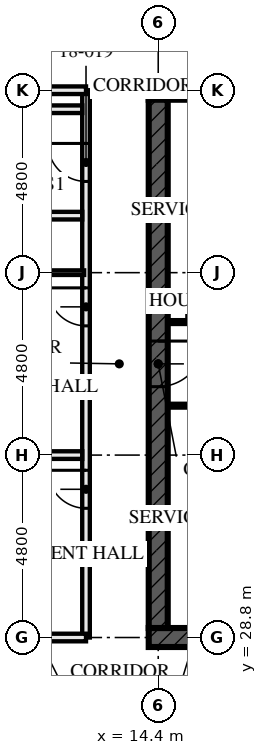
"""IFC4 building model, lengths in metres.
Left out: names, types, materials, properties, quantities, classifications, styles, units other than length and angle.
Written with IfcOpenShell. Run it as: python <this file> out.ifc"""

import sys

from ifc_helpers import new_model, si_unit, direction, frame, frame_2d, origin, place, context, subcontext, project, spatial, rectangle, extrude, element, fill, save


model = new_model("IFC4")
c1 = context("Model", 3, precision=1e-05, world=origin(), true_north=direction((0.0, 1.0)))
c2 = subcontext(c1, "Body", "Model", "MODEL_VIEW")
j1 = project(units=[si_unit("LENGTHUNIT", "METRE"), si_unit("PLANEANGLEUNIT", "RADIAN")], contexts=[c1])
p1 = place(None, origin())
s1 = spatial("IfcSite", under=j1, at=p1, CompositionType="ELEMENT")
p2 = place(p1, origin())
s2 = spatial("IfcBuilding", under=s1, at=p2, CompositionType="ELEMENT")
p3 = place(p2, frame((0.0, 0.0, 69.0)))
s3 = spatial("IfcBuildingStorey", under=s2, at=p3, CompositionType="ELEMENT", Elevation=69.0)
p4 = place(p3, frame((14.15, 28.8, -0.17), z_axis=(0.0, 0.0, 1.0), x_axis=(1.0, 0.0, 0.0)))
e1 = element("IfcWall", 1, at=p4, inside=s3, PredefinedType="SHEAR", context=c2, shape_type="SweptSolid", body=[
    extrude(rectangle(XDim=14.9, YDim=0.5, at=frame_2d((7.45, 0.0))), origin(), (0.0, 0.0, 1.0), 3.5),
])
p5 = place(p4, frame((6.85, 0.0, 0.17)))
e2 = element("IfcOpeningElement", 2, at=p5, cuts=e1, PredefinedType="OPENING", context=c2, shape_type="SweptSolid", body=[
    extrude(rectangle(XDim=1.2, YDim=2.1, at=frame_2d((0.6, 1.05))), frame((0.0, 0.26, 0.0), z_axis=(0.0, -1.0, 0.0), x_axis=(1.0, 0.0, 0.0)), (0.0, 0.0, 1.0), 0.521),
])
p6 = place(p3, frame((29.05, 43.2, -0.17), z_axis=(0.0, 0.0, 1.0), x_axis=(-1.0, 0.0, 0.0)))
e3 = element("IfcWall", 3, at=p6, inside=s3, PredefinedType="SHEAR", context=c2, shape_type="SweptSolid", body=[
    extrude(rectangle(XDim=14.9, YDim=0.5, at=frame_2d((7.45, 0.0))), origin(), (0.0, 0.0, 1.0), 3.5),
])
p7 = place(p6, frame((6.85, 0.0, 0.17)))
e4 = element("IfcOpeningElement", 4, at=p7, cuts=e3, PredefinedType="OPENING", context=c2, shape_type="SweptSolid", body=[
    extrude(rectangle(XDim=1.2, YDim=2.1, at=frame_2d((0.6, 1.05))), frame((0.0, 0.26, 0.0), z_axis=(0.0, -1.0, 0.0), x_axis=(1.0, 0.0, 0.0)), (0.0, 0.0, 1.0), 0.521),
])
p8 = place(p3, frame((14.4, 42.95, -0.17), z_axis=(0.0, 0.0, 1.0), x_axis=(0.0, -1.0, 0.0)))
e5 = element("IfcWall", 5, at=p8, inside=s3, PredefinedType="SHEAR", context=c2, shape_type="SweptSolid", body=[
    extrude(rectangle(XDim=13.9, YDim=0.5, at=frame_2d((6.95, 0.0))), origin(), (0.0, 0.0, 1.0), 3.5),
])
p9 = place(p8, frame((6.35, 0.0, 0.17)))
e6 = element("IfcOpeningElement", 6, at=p9, cuts=e5, PredefinedType="OPENING", context=c2, shape_type="SweptSolid", body=[
    extrude(rectangle(XDim=1.2, YDim=2.1, at=frame_2d((0.6, 1.05))), frame((0.0, 0.26, 0.0), z_axis=(0.0, -1.0, 0.0), x_axis=(1.0, 0.0, 0.0)), (0.0, 0.0, 1.0), 0.521),
])
for number, where, z_axis, x_axis in (
    (7, (7.7, 42.7, 0.0), (0.0, 0.0, 1.0), (1.0, 0.0, 0.0)),
    (8, (7.7, 39.9, 0.0), (0.0, 0.0, 1.0), (1.0, 0.0, 0.0)),
):
    element("IfcWall", number, at=place(p3, frame(where, z_axis=z_axis, x_axis=x_axis)), inside=s3, PredefinedType="SOLIDWALL", context=c2, shape_type="SweptSolid", body=[
        extrude(rectangle(XDim=4.7, YDim=0.2, at=frame_2d((2.35, 0.0))), origin(), (0.0, 0.0, 1.0), 2.99),
    ])
p10 = place(p3, frame((6.2, 38.4, 0.0), z_axis=(0.0, 0.0, 1.0), x_axis=(1.0, 0.0, 0.0)))
e9 = element("IfcWall", 9, at=p10, inside=s3, PredefinedType="PARTITIONING", context=c2, shape_type="SweptSolid", body=[
    extrude(rectangle(XDim=6.25, YDim=0.12, at=frame_2d((3.125, 0.0))), origin(), (0.0, 0.0, 1.0), 2.55),
])
p11 = place(p10, frame((3.9, 0.0, 0.0)))
e10 = element("IfcOpeningElement", 10, at=p11, cuts=e9, PredefinedType="OPENING", context=c2, shape_type="SweptSolid", body=[
    extrude(rectangle(XDim=0.9, YDim=2.1, at=frame_2d((0.45, 1.05))), frame((0.0, 0.071, 0.0), z_axis=(0.0, -1.0, 0.0), x_axis=(1.0, 0.0, 0.0)), (0.0, 0.0, 1.0), 0.141),
])
p12 = place(p3, frame((0.32, 33.6, 0.0), z_axis=(0.0, 0.0, 1.0), x_axis=(1.0, 0.0, 0.0)))
e11 = element("IfcWall", 11, at=p12, inside=s3, PredefinedType="PARTITIONING", context=c2, shape_type="SweptSolid", body=[
    extrude(rectangle(XDim=12.08, YDim=0.2, at=frame_2d((6.04, 0.0))), origin(), (0.0, 0.0, 1.0), 2.55),
])
p13 = place(p3, frame((12.5, 43.2, 0.0), z_axis=(0.0, 0.0, 1.0), x_axis=(0.0, -1.0, 0.0)))
e12 = element("IfcWall", 12, at=p13, inside=s3, PredefinedType="PARTITIONING", context=c2, shape_type="SweptSolid", body=[
    extrude(rectangle(XDim=14.4, YDim=0.2, at=frame_2d((7.2, 0.0))), origin(), (0.0, 0.0, 1.0), 2.55),
])
p14 = place(p13, frame((1.4, 0.0, 0.0)))
e13 = element("IfcOpeningElement", 13, at=p14, cuts=e12, PredefinedType="OPENING", context=c2, shape_type="SweptSolid", body=[
    extrude(rectangle(XDim=1.0, YDim=2.1, at=frame_2d((0.5, 1.05))), frame((0.0, 0.111, 0.0), z_axis=(0.0, -1.0, 0.0), x_axis=(1.0, 0.0, 0.0)), (0.0, 0.0, 1.0), 0.221),
])
p15 = place(p13, frame((5.2, 0.0, 0.0)))
e14 = element("IfcOpeningElement", 14, at=p15, cuts=e12, PredefinedType="OPENING", context=c2, shape_type="SweptSolid", body=[
    extrude(rectangle(XDim=1.0, YDim=2.1, at=frame_2d((0.5, 1.05))), frame((0.0, 0.111, 0.0), z_axis=(0.0, -1.0, 0.0), x_axis=(1.0, 0.0, 0.0)), (0.0, 0.0, 1.0), 0.221),
])
p16 = place(p13, frame((10.0, 0.0, 0.0)))
e15 = element("IfcOpeningElement", 15, at=p16, cuts=e12, PredefinedType="OPENING", context=c2, shape_type="SweptSolid", body=[
    extrude(rectangle(XDim=1.0, YDim=2.1, at=frame_2d((0.5, 1.05))), frame((0.0, 0.111, 0.0), z_axis=(0.0, -1.0, 0.0), x_axis=(1.0, 0.0, 0.0)), (0.0, 0.0, 1.0), 0.221),
])
p17 = place(p3, frame((14.65, 34.9, 0.0), z_axis=(0.0, 0.0, 1.0), x_axis=(1.0, 0.0, 0.0)))
e16 = element("IfcWall", 16, at=p17, inside=s3, PredefinedType="SOLIDWALL", context=c2, shape_type="SweptSolid", body=[
    extrude(rectangle(XDim=5.9, YDim=0.1, at=frame_2d((2.95, 0.0))), origin(), (0.0, 0.0, 1.0), 3.33),
])
p18 = place(p17, frame((1.6, 0.0, 0.0)))
e17 = element("IfcOpeningElement", 17, at=p18, cuts=e16, PredefinedType="OPENING", context=c2, shape_type="SweptSolid", body=[
    extrude(rectangle(XDim=0.7, YDim=2.1, at=frame_2d((0.35, 1.05))), frame((0.0, 0.061, 0.0), z_axis=(0.0, -1.0, 0.0), x_axis=(1.0, 0.0, 0.0)), (0.0, 0.0, 1.0), 0.121),
])
p19 = place(p3, frame((14.65, 37.1, 0.0), z_axis=(0.0, 0.0, 1.0), x_axis=(1.0, 0.0, 0.0)))
e18 = element("IfcWall", 18, at=p19, inside=s3, PredefinedType="SOLIDWALL", context=c2, shape_type="SweptSolid", body=[
    extrude(rectangle(XDim=5.9, YDim=0.1, at=frame_2d((2.95, 0.0))), origin(), (0.0, 0.0, 1.0), 3.33),
])
p20 = place(p19, frame((0.5, 0.0, 0.0)))
e19 = element("IfcOpeningElement", 19, at=p20, cuts=e18, PredefinedType="OPENING", context=c2, shape_type="SweptSolid", body=[
    extrude(rectangle(XDim=0.7, YDim=2.1, at=frame_2d((0.35, 1.05))), frame((0.0, 0.061, 0.0), z_axis=(0.0, -1.0, 0.0), x_axis=(1.0, 0.0, 0.0)), (0.0, 0.0, 1.0), 0.121),
])
p21 = place(p19, frame((1.85, 0.0, 0.0)))
e20 = element("IfcOpeningElement", 20, at=p21, cuts=e18, PredefinedType="OPENING", context=c2, shape_type="SweptSolid", body=[
    extrude(rectangle(XDim=0.9, YDim=2.1, at=frame_2d((0.45, 1.05))), frame((0.0, 0.061, 0.0), z_axis=(0.0, -1.0, 0.0), x_axis=(1.0, 0.0, 0.0)), (0.0, 0.0, 1.0), 0.121),
])
for number, where, z_axis, x_axis in (
    (21, (12.5, 28.8, 0.0), (0.0, 0.0, 1.0), (-1.0, 0.0, 0.0)),
    (22, (12.5, 43.2, 0.0), (0.0, 0.0, 1.0), (-1.0, 0.0, 0.0)),
):
    element("IfcWall", number, at=place(p3, frame(where, z_axis=z_axis, x_axis=x_axis)), inside=s3, PredefinedType="PARTITIONING", context=c2, shape_type="SweptSolid", body=[
        extrude(rectangle(XDim=2.505, YDim=0.2, at=frame_2d((1.252, 0.0))), origin(), (0.0, 0.0, 1.0), 2.32),
    ])
p22 = place(p14, frame((1.0, 0.0, 0.0), z_axis=(0.0, 0.0, 1.0), x_axis=(-1.0, 0.0, 0.0)))
e23 = element("IfcDoor", 23, at=p22, inside=s3, OperationType="SINGLE_SWING_LEFT", PredefinedType="DOOR", context=c2, shape_type="SweptSolid", body=[
    extrude(rectangle(XDim=1.0, YDim=2.1, at=frame_2d((0.5, 1.05))), frame((0.0, 0.032, 0.0), z_axis=(0.0, -1.0, 0.0), x_axis=(1.0, 0.0, 0.0)), (0.0, 0.0, 1.0), 0.064),
])
fill(e13, e23)
p23 = place(p15, frame((1.0, 0.0, 0.0), z_axis=(0.0, 0.0, 1.0), x_axis=(-1.0, 0.0, 0.0)))
e24 = element("IfcDoor", 24, at=p23, inside=s3, OperationType="SINGLE_SWING_LEFT", PredefinedType="DOOR", context=c2, shape_type="SweptSolid", body=[
    extrude(rectangle(XDim=1.0, YDim=2.1, at=frame_2d((0.5, 1.05))), frame((0.0, 0.027, 0.0), z_axis=(0.0, -1.0, 0.0), x_axis=(1.0, 0.0, 0.0)), (0.0, 0.0, 1.0), 0.054),
])
fill(e14, e24)
p24 = place(p16, frame((1.0, 0.0, 0.0), z_axis=(0.0, 0.0, 1.0), x_axis=(-1.0, 0.0, 0.0)))
e25 = element("IfcDoor", 25, at=p24, inside=s3, OperationType="SINGLE_SWING_LEFT", PredefinedType="DOOR", context=c2, shape_type="SweptSolid", body=[
    extrude(rectangle(XDim=1.0, YDim=2.1, at=frame_2d((0.5, 1.05))), frame((0.0, 0.027, 0.0), z_axis=(0.0, -1.0, 0.0), x_axis=(1.0, 0.0, 0.0)), (0.0, 0.0, 1.0), 0.054),
])
fill(e15, e25)
p25 = place(p9, origin())
e26 = element("IfcDoor", 26, at=p25, inside=s3, OperationType="SINGLE_SWING_LEFT", PredefinedType="DOOR", context=c2, shape_type="SweptSolid", body=[
    extrude(rectangle(XDim=1.2, YDim=2.1, at=frame_2d((0.6, 1.05))), frame((0.0, 0.027, 0.0), z_axis=(0.0, -1.0, 0.0), x_axis=(1.0, 0.0, 0.0)), (0.0, 0.0, 1.0), 0.054),
])
fill(e6, e26)
save(model, sys.argv[1])
